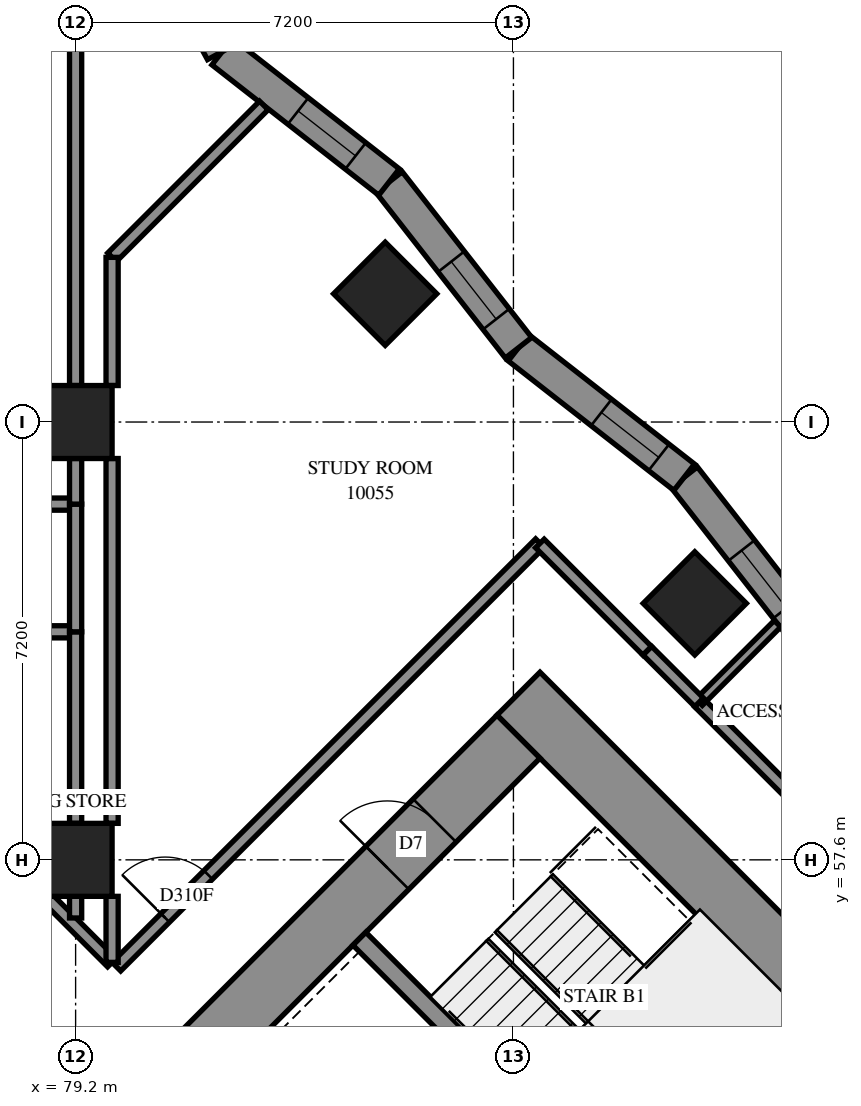
"""IFC4 building model, lengths in metres.
Left out: names, types, materials, properties, quantities, classifications, styles, units other than length and angle.
Written with IfcOpenShell. Run it as: python <this file> out.ifc"""

import sys

from ifc_helpers import new_model, si_unit, direction, frame, frame_2d, origin, origin_2d, place, context, subcontext, project, spatial, polyline, rectangle, outline, extrude, element, fill, save


model = new_model("IFC4")
c1 = context("Model", 3, precision=1e-05, world=origin(), true_north=direction((0.0, 1.0)))
c2 = subcontext(c1, "Body", "Model", "MODEL_VIEW")
j1 = project(units=[si_unit("LENGTHUNIT", "METRE"), si_unit("PLANEANGLEUNIT", "RADIAN")], contexts=[c1])
p1 = place(None, origin())
s1 = spatial("IfcSite", under=j1, at=p1, CompositionType="ELEMENT")
p2 = place(p1, origin())
s2 = spatial("IfcBuilding", under=s1, at=p2, CompositionType="ELEMENT")
p3 = place(p2, frame((0.0, 0.0, 40.6)))
s3 = spatial("IfcBuildingStorey", under=s2, at=p3, CompositionType="ELEMENT", Elevation=40.6)
for number, where, z_axis, x_axis in (
    (1, (79.2, 57.6, 0.0), (0.0, 0.0, 1.0), (1.0, 0.0, 0.0)),
    (2, (79.2, 64.8, 0.0), (0.0, 0.0, 1.0), (1.0, 0.0, 0.0)),
    (3, (84.291, 66.909, 0.0), (0.0, 0.0, 1.0), (0.707, -0.707, 0.0)),
    (4, (89.382, 61.818, 0.0), (0.0, 0.0, 1.0), (0.707, -0.707, 0.0)),
):
    element("IfcColumn", number, at=place(p3, frame(where, z_axis=z_axis, x_axis=x_axis)), inside=s3, PredefinedType="COLUMN", context=c2, shape_type="SweptSolid", body=[
        extrude(rectangle(XDim=1.2, YDim=1.2, at=origin_2d()), origin(), (0.0, 0.0, 1.0), 3.1),
    ])
p4 = place(p3, frame((86.483, 60.333, -0.3), z_axis=(0.0, 0.0, 1.0), x_axis=(0.70710983, -0.7071037324, 0.0)))
e5 = element("IfcWall", 5, at=p4, inside=s3, PredefinedType="SHEAR", context=c2, shape_type="SweptSolid", body=[
    extrude(rectangle(XDim=16.4, YDim=1.0, at=frame_2d((8.2, 0.0))), origin(), (0.0, 0.0, 1.0), 2.7),
])
p5 = place(p4, frame((11.0, 0.0, 0.3)))
e6 = element("IfcOpeningElement", 6, at=p5, cuts=e5, PredefinedType="OPENING", context=c2, shape_type="SweptSolid", body=[
    extrude(rectangle(XDim=0.8, YDim=2.1, at=frame_2d((0.4, 1.05))), frame((0.0, 0.51, 0.0), z_axis=(0.0, -1.0, 0.0), x_axis=(1.0, 0.0, 0.0)), (0.0, 0.0, 1.0), 1.02),
])
p6 = place(p3, frame((76.301, 49.443, -0.3), z_axis=(0.0, 0.0, 1.0), x_axis=(0.7071067812, 0.7071067812, 0.0)))
e7 = element("IfcWall", 7, at=p6, inside=s3, PredefinedType="SHEAR", context=c2, shape_type="SweptSolid", body=[
    extrude(rectangle(XDim=14.4, YDim=1.0, at=frame_2d((7.2, 0.0))), origin(), (0.0, 0.0, 1.0), 2.7),
])
p7 = place(p6, frame((4.55, 0.0, 0.3)))
e8 = element("IfcOpeningElement", 8, at=p7, cuts=e7, PredefinedType="OPENING", context=c2, shape_type="SweptSolid", body=[
    extrude(rectangle(XDim=1.1, YDim=2.1, at=frame_2d((0.55, 1.05))), frame((0.0, 0.51, 0.0), z_axis=(0.0, -1.0, 0.0), x_axis=(1.0, 0.0, 0.0)), (0.0, 0.0, 1.0), 1.02),
])
p8 = place(p6, frame((11.35, 0.0, 0.3)))
e9 = element("IfcOpeningElement", 9, at=p8, cuts=e7, PredefinedType="OPENING", context=c2, shape_type="SweptSolid", body=[
    extrude(rectangle(XDim=1.1, YDim=2.1, at=frame_2d((0.55, 1.05))), frame((0.0, 0.51, 0.0), z_axis=(0.0, -1.0, 0.0), x_axis=(1.0, 0.0, 0.0)), (0.0, 0.0, 1.0), 1.02),
])
p9 = place(p3, frame((83.867, 56.302, 0.0), z_axis=(0.0, 0.0, 1.0), x_axis=(0.7071137256, -0.7070998367, 0.0)))
e10 = element("IfcWall", 10, at=p9, inside=s3, PredefinedType="SOLIDWALL", context=c2, shape_type="SweptSolid", body=[
    extrude(rectangle(XDim=7.2, YDim=0.3, at=frame_2d((3.6, 0.0))), origin(), (0.0, 0.0, 1.0), 3.1),
])
p10 = place(p3, frame((91.338, 61.167, 0.0), z_axis=(0.0, 0.0, 1.0), x_axis=(-0.6157467261, 0.787944141, 0.0)))
e11 = element("IfcWall", 11, at=p10, inside=s3, PredefinedType="SOLIDWALL", context=c2, shape_type="SweptSolid", body=[
    extrude(outline(polyline([(0.034, -0.275), (3.492, -0.275), (3.425, 0.275), (-0.034, 0.275), (0.034, -0.275)])), origin(), (0.0, 0.0, 1.0), 3.1),
])
p11 = place(p10, frame((0.728, 0.0, 0.5)))
e12 = element("IfcOpeningElement", 12, at=p11, cuts=e11, PredefinedType="OPENING", context=c2, shape_type="SweptSolid", body=[
    extrude(rectangle(XDim=1.2, YDim=2.45, at=frame_2d((0.6, 1.225))), frame((0.0, 0.285, 0.0), z_axis=(0.0, -1.0, 0.0), x_axis=(1.0, 0.0, 0.0)), (0.0, 0.0, 1.0), 0.57),
])
p12 = place(p3, frame((89.208, 63.892, 0.0), z_axis=(0.0, 0.0, 1.0), x_axis=(-0.7879331771, 0.6157607558, 0.0)))
e13 = element("IfcWall", 13, at=p12, inside=s3, PredefinedType="SOLIDWALL", context=c2, shape_type="SweptSolid", body=[
    extrude(outline(polyline([(-0.034, -0.275), (3.425, -0.275), (3.492, 0.275), (0.034, 0.275), (-0.034, -0.275)])), origin(), (0.0, 0.0, 1.0), 3.1),
])
p13 = place(p12, frame((0.529, 0.0, 0.5)))
e14 = element("IfcOpeningElement", 14, at=p13, cuts=e13, PredefinedType="OPENING", context=c2, shape_type="SweptSolid", body=[
    extrude(rectangle(XDim=1.2, YDim=2.45, at=frame_2d((0.6, 1.225))), frame((0.0, 0.285, 0.0), z_axis=(0.0, -1.0, 0.0), x_axis=(1.0, 0.0, 0.0)), (0.0, 0.0, 1.0), 0.57),
])
p14 = place(p3, frame((86.484, 66.022, 0.0), z_axis=(0.0, 0.0, 1.0), x_axis=(-0.6157787082, 0.7879191472, 0.0)))
e15 = element("IfcWall", 15, at=p14, inside=s3, PredefinedType="SOLIDWALL", context=c2, shape_type="SweptSolid", body=[
    extrude(outline(polyline([(0.034, -0.275), (3.492, -0.275), (3.425, 0.275), (-0.034, 0.275), (0.034, -0.275)])), origin(), (0.0, 0.0, 1.0), 3.1),
])
p15 = place(p14, frame((0.597, 0.0, 0.5)))
e16 = element("IfcOpeningElement", 16, at=p15, cuts=e15, PredefinedType="OPENING", context=c2, shape_type="SweptSolid", body=[
    extrude(rectangle(XDim=1.2, YDim=2.45, at=frame_2d((0.6, 1.225))), frame((0.0, 0.285, 0.0), z_axis=(0.0, -1.0, 0.0), x_axis=(1.0, 0.0, 0.0)), (0.0, 0.0, 1.0), 0.57),
])
p16 = place(p3, frame((84.354, 68.746, 0.0), z_axis=(0.0, 0.0, 1.0), x_axis=(-0.7879242152, 0.6157722233, 0.0)))
e17 = element("IfcWall", 17, at=p16, inside=s3, PredefinedType="SOLIDWALL", context=c2, shape_type="SweptSolid", body=[
    extrude(outline(polyline([(-0.034, -0.275), (3.425, -0.275), (3.539, 0.275), (0.034, 0.275), (-0.034, -0.275)])), origin(), (0.0, 0.0, 1.0), 3.1),
])
p17 = place(p16, frame((0.698, 0.0, 0.5)))
e18 = element("IfcOpeningElement", 18, at=p17, cuts=e17, PredefinedType="OPENING", context=c2, shape_type="SweptSolid", body=[
    extrude(rectangle(XDim=1.2, YDim=2.45, at=frame_2d((0.6, 1.225))), frame((0.0, 0.285, 0.0), z_axis=(0.0, -1.0, 0.0), x_axis=(1.0, 0.0, 0.0)), (0.0, 0.0, 1.0), 0.57),
])
p18 = place(p3, frame((81.611, 70.891, 0.0), z_axis=(0.0, 0.0, 1.0), x_axis=(-0.4761692104, 0.8793536735, 0.0)))
e19 = element("IfcWall", 19, at=p18, inside=s3, PredefinedType="SOLIDWALL", context=c2, shape_type="SweptSolid", body=[
    extrude(outline(polyline([(0.057, -0.275), (3.639, -0.275), (3.204, 0.275), (-0.057, 0.275), (0.057, -0.275)])), origin(), (0.0, 0.0, 1.0), 3.1),
])
p19 = place(p18, frame((0.798, 0.0, 0.5)))
e20 = element("IfcOpeningElement", 20, at=p19, cuts=e19, PredefinedType="OPENING", context=c2, shape_type="SweptSolid", body=[
    extrude(rectangle(XDim=1.2, YDim=2.45, at=frame_2d((0.6, 1.225))), frame((0.0, 0.285, 0.0), z_axis=(0.0, -1.0, 0.0), x_axis=(1.0, 0.0, 0.0)), (0.0, 0.0, 1.0), 0.57),
])
p20 = place(p3, frame((79.871, 55.843, 0.0), z_axis=(0.0, 0.0, 1.0), x_axis=(0.7071067812, 0.7071067812, 0.0)))
e21 = element("IfcWall", 21, at=p20, inside=s3, PredefinedType="PARTITIONING", context=c2, shape_type="SweptSolid", body=[
    extrude(rectangle(XDim=9.85, YDim=0.2, at=frame_2d((4.925, 0.0))), origin(), (0.0, 0.0, 1.0), 3.1),
])
p21 = place(p20, frame((1.135, 0.0, 0.0)))
e22 = element("IfcOpeningElement", 22, at=p21, cuts=e21, PredefinedType="OPENING", context=c2, shape_type="SweptSolid", body=[
    extrude(rectangle(XDim=1.0, YDim=2.1, at=frame_2d((0.5, 1.05))), frame((0.0, 0.11, 0.0), z_axis=(0.0, -1.0, 0.0), x_axis=(1.0, 0.0, 0.0)), (0.0, 0.0, 1.0), 0.22),
])
p22 = place(p3, frame((89.451, 60.189, 0.0), z_axis=(0.0, 0.0, 1.0), x_axis=(0.7071796965, -0.7070338583, 0.0)))
e23 = element("IfcWall", 23, at=p22, inside=s3, PredefinedType="PARTITIONING", context=c2, shape_type="SweptSolid", body=[
    extrude(rectangle(XDim=9.6, YDim=0.2, at=frame_2d((4.8, 0.0))), origin(), (0.0, 0.0, 1.0), 3.1),
])
p23 = place(p22, frame((7.315, 0.0, 0.0)))
e24 = element("IfcOpeningElement", 24, at=p23, cuts=e23, PredefinedType="OPENING", context=c2, shape_type="SweptSolid", body=[
    extrude(rectangle(XDim=0.9, YDim=2.1, at=frame_2d((0.45, 1.05))), frame((0.0, 0.11, 0.0), z_axis=(0.0, -1.0, 0.0), x_axis=(1.0, 0.0, 0.0)), (0.0, 0.0, 1.0), 0.22),
])
for number, where, z_axis, x_axis in (
    (25, (79.2, 65.4, 0.0), (0.0, 0.0, 1.0), (0.0, 1.0, 0.0)),
    (26, (79.8, 58.2, 0.0), (0.0, 0.0, 1.0), (0.0, 1.0, 0.0)),
):
    element("IfcWall", number, at=place(p3, frame(where, z_axis=z_axis, x_axis=x_axis)), inside=s3, PredefinedType="PARTITIONING", context=c2, shape_type="SweptSolid", body=[
        extrude(rectangle(XDim=6.0, YDim=0.2, at=frame_2d((3.0, 0.0))), origin(), (0.0, 0.0, 1.0), 3.1),
    ])
p24 = place(p3, frame((74.51, 63.45, 0.0), z_axis=(0.0, 0.0, 1.0), x_axis=(1.0, 0.0, 0.0)))
e27 = element("IfcWall", 27, at=p24, inside=s3, PredefinedType="PARTITIONING", context=c2, shape_type="SweptSolid", body=[
    extrude(rectangle(XDim=4.69, YDim=0.2, at=frame_2d((2.345, 0.0))), origin(), (0.0, 0.0, 1.0), 3.1),
])
p25 = place(p24, frame((3.12, 0.0, 0.0)))
e28 = element("IfcOpeningElement", 28, at=p25, cuts=e27, PredefinedType="OPENING", context=c2, shape_type="SweptSolid", body=[
    extrude(rectangle(XDim=0.9, YDim=2.1, at=frame_2d((0.45, 1.05))), frame((0.0, 0.11, 0.0), z_axis=(0.0, -1.0, 0.0), x_axis=(1.0, 0.0, 0.0)), (0.0, 0.0, 1.0), 0.22),
])
p26 = place(p3, frame((74.882, 61.35, 0.0), z_axis=(0.0, 0.0, 1.0), x_axis=(1.0, 0.0, 0.0)))
e29 = element("IfcWall", 29, at=p26, inside=s3, PredefinedType="PARTITIONING", context=c2, shape_type="SweptSolid", body=[
    extrude(rectangle(XDim=4.318, YDim=0.2, at=frame_2d((2.159, 0.0))), origin(), (0.0, 0.0, 1.0), 3.1),
])
p27 = place(p26, frame((0.78, 0.0, 0.0)))
e30 = element("IfcOpeningElement", 30, at=p27, cuts=e29, PredefinedType="OPENING", context=c2, shape_type="SweptSolid", body=[
    extrude(rectangle(XDim=1.0, YDim=2.1, at=frame_2d((0.5, 1.05))), frame((0.0, 0.11, 0.0), z_axis=(0.0, -1.0, 0.0), x_axis=(1.0, 0.0, 0.0)), (0.0, 0.0, 1.0), 0.22),
])
p28 = place(p3, frame((79.799, 67.509, 0.0), z_axis=(0.0, 0.0, 1.0), x_axis=(0.7070926216, 0.7071209405, 0.0)))
e31 = element("IfcWall", 31, at=p28, inside=s3, PredefinedType="PARTITIONING", context=c2, shape_type="SweptSolid", body=[
    extrude(rectangle(XDim=3.531, YDim=0.2, at=frame_2d((1.766, 0.0))), origin(), (0.0, 0.0, 1.0), 3.1),
])
p29 = place(p3, frame((79.2, 58.2, 0.0), z_axis=(0.0, 0.0, 1.0), x_axis=(0.0, 1.0, 0.0)))
e32 = element("IfcWall", 32, at=p29, inside=s3, PredefinedType="PARTITIONING", context=c2, shape_type="SweptSolid", body=[
    extrude(rectangle(XDim=3.15, YDim=0.2, at=frame_2d((1.575, 0.0))), origin(), (0.0, 0.0, 1.0), 3.1),
])
p30 = place(p3, frame((86.835, 62.803, 0.0), z_axis=(0.0, 0.0, 1.0), x_axis=(0.7071067812, -0.7071067812, 0.0)))
e33 = element("IfcWall", 33, at=p30, inside=s3, PredefinedType="PARTITIONING", context=c2, shape_type="SweptSolid", body=[
    extrude(rectangle(XDim=2.498, YDim=0.2, at=frame_2d((1.249, 0.0))), origin(), (0.0, 0.0, 1.0), 3.1),
])
p31 = place(p3, frame((79.8, 65.4, 0.0), z_axis=(0.0, 0.0, 1.0), x_axis=(0.0, 1.0, 0.0)))
e34 = element("IfcWall", 34, at=p31, inside=s3, PredefinedType="PARTITIONING", context=c2, shape_type="SweptSolid", body=[
    extrude(rectangle(XDim=2.108, YDim=0.2, at=frame_2d((1.054, 0.0))), origin(), (0.0, 0.0, 1.0), 3.1),
])
p32 = place(p3, frame((79.2, 61.35, 0.0), z_axis=(0.0, 0.0, 1.0), x_axis=(0.0, 1.0, 0.0)))
e35 = element("IfcWall", 35, at=p32, inside=s3, PredefinedType="PARTITIONING", context=c2, shape_type="SweptSolid", body=[
    extrude(rectangle(XDim=2.1, YDim=0.2, at=frame_2d((1.05, 0.0))), origin(), (0.0, 0.0, 1.0), 3.1),
])
p33 = place(p3, frame((89.453, 60.193, 0.0), z_axis=(0.0, 0.0, 1.0), x_axis=(0.7071341975, 0.7070793639, 0.0)))
e36 = element("IfcWall", 36, at=p33, inside=s3, PredefinedType="PARTITIONING", context=c2, shape_type="SweptSolid", body=[
    extrude(rectangle(XDim=1.824, YDim=0.15, at=frame_2d((0.912, 0.0))), origin(), (0.0, 0.0, 1.0), 3.1),
])
p34 = place(p3, frame((78.711, 56.997, 0.0), z_axis=(0.0, 0.0, 1.0), x_axis=(0.7071067812, -0.7071067812, 0.0)))
e37 = element("IfcWall", 37, at=p34, inside=s3, PredefinedType="PARTITIONING", context=c2, shape_type="SweptSolid", body=[
    extrude(rectangle(XDim=1.536, YDim=0.2, at=frame_2d((0.768, 0.0))), origin(), (0.0, 0.0, 1.0), 3.1),
])
p35 = place(p3, frame((88.603, 61.039, 0.0), z_axis=(0.0, 0.0, 1.0), x_axis=(0.7079391603, -0.7062734211, 0.0)))
e38 = element("IfcWall", 38, at=p35, inside=s3, PredefinedType="PARTITIONING", context=c2, shape_type="SweptSolid", body=[
    extrude(rectangle(XDim=1.201, YDim=0.2, at=frame_2d((0.6, 0.0))), origin(), (0.0, 0.0, 1.0), 3.1),
])
p36 = place(p3, frame((79.8, 55.914, 0.0), z_axis=(0.0, 0.0, 1.0), x_axis=(0.0, 1.0, 0.0)))
e39 = element("IfcWall", 39, at=p36, inside=s3, PredefinedType="PARTITIONING", context=c2, shape_type="SweptSolid", body=[
    extrude(rectangle(XDim=1.086, YDim=0.2, at=frame_2d((0.543, 0.0))), origin(), (0.0, 0.0, 1.0), 3.1),
])
p37 = place(p3, frame((79.2, 63.45, 0.0), z_axis=(0.0, 0.0, 1.0), x_axis=(0.0, 1.0, 0.0)))
e40 = element("IfcWall", 40, at=p37, inside=s3, PredefinedType="PARTITIONING", context=c2, shape_type="SweptSolid", body=[
    extrude(rectangle(XDim=0.75, YDim=0.2, at=frame_2d((0.375, 0.0))), origin(), (0.0, 0.0, 1.0), 3.1),
])
p38 = place(p3, frame((79.2, 56.644, 0.0), z_axis=(0.0, 0.0, 1.0), x_axis=(0.0, 1.0, 0.0)))
e41 = element("IfcWall", 41, at=p38, inside=s3, PredefinedType="PARTITIONING", context=c2, shape_type="SweptSolid", body=[
    extrude(rectangle(XDim=0.356, YDim=0.2, at=frame_2d((0.178, 0.0))), origin(), (0.0, 0.0, 1.0), 3.1),
])
p39 = place(p11, origin())
e42 = element("IfcWindow", 42, at=p39, inside=s3, PartitioningType="SINGLE_PANEL", PredefinedType="WINDOW", context=c2, shape_type="SweptSolid", body=[
    extrude(rectangle(XDim=1.2, YDim=2.45, at=frame_2d((0.6, 1.225))), frame((0.0, 0.155, 0.0), z_axis=(0.0, -1.0, 0.0), x_axis=(1.0, 0.0, 0.0)), (0.0, 0.0, 1.0), 0.06),
])
fill(e12, e42)
p40 = place(p13, origin())
e43 = element("IfcWindow", 43, at=p40, inside=s3, PartitioningType="SINGLE_PANEL", PredefinedType="WINDOW", context=c2, shape_type="SweptSolid", body=[
    extrude(rectangle(XDim=1.2, YDim=2.45, at=frame_2d((0.6, 1.225))), frame((0.0, 0.155, 0.0), z_axis=(0.0, -1.0, 0.0), x_axis=(1.0, 0.0, 0.0)), (0.0, 0.0, 1.0), 0.06),
])
fill(e14, e43)
p41 = place(p15, origin())
e44 = element("IfcWindow", 44, at=p41, inside=s3, PartitioningType="SINGLE_PANEL", PredefinedType="WINDOW", context=c2, shape_type="SweptSolid", body=[
    extrude(rectangle(XDim=1.2, YDim=2.45, at=frame_2d((0.6, 1.225))), frame((0.0, 0.155, 0.0), z_axis=(0.0, -1.0, 0.0), x_axis=(1.0, 0.0, 0.0)), (0.0, 0.0, 1.0), 0.06),
])
fill(e16, e44)
p42 = place(p17, origin())
e45 = element("IfcWindow", 45, at=p42, inside=s3, PartitioningType="SINGLE_PANEL", PredefinedType="WINDOW", context=c2, shape_type="SweptSolid", body=[
    extrude(rectangle(XDim=1.2, YDim=2.45, at=frame_2d((0.6, 1.225))), frame((0.0, 0.155, 0.0), z_axis=(0.0, -1.0, 0.0), x_axis=(1.0, 0.0, 0.0)), (0.0, 0.0, 1.0), 0.06),
])
fill(e18, e45)
p43 = place(p8, origin())
e46 = element("IfcDoor", 46, at=p43, inside=s3, OperationType="SINGLE_SWING_LEFT", PredefinedType="DOOR", context=c2, shape_type="SweptSolid", body=[
    extrude(rectangle(XDim=1.1, YDim=2.1, at=frame_2d((0.55, 1.05))), frame((0.0, 0.025, 0.0), z_axis=(0.0, -1.0, 0.0), x_axis=(1.0, 0.0, 0.0)), (0.0, 0.0, 1.0), 0.05),
])
fill(e9, e46)
p44 = place(p21, origin())
e47 = element("IfcDoor", 47, at=p44, inside=s3, OperationType="SINGLE_SWING_RIGHT", PredefinedType="DOOR", context=c2, shape_type="SweptSolid", body=[
    extrude(rectangle(XDim=1.0, YDim=2.1, at=frame_2d((0.5, 1.05))), frame((0.0, 0.025, 0.0), z_axis=(0.0, -1.0, 0.0), x_axis=(1.0, 0.0, 0.0)), (0.0, 0.0, 1.0), 0.05),
])
fill(e22, e47)
save(model, sys.argv[1])
